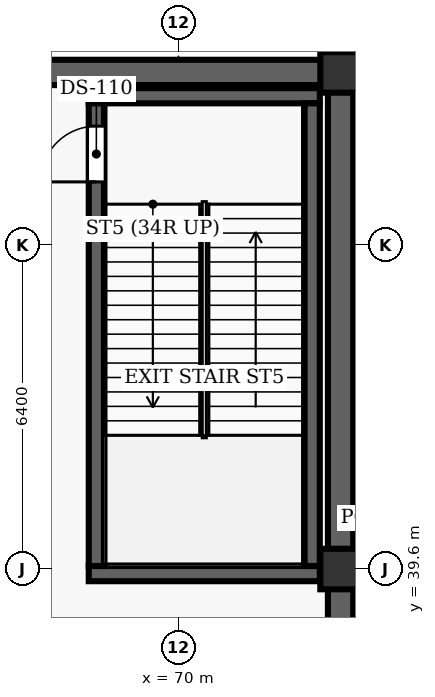
"""IFC4 building model, lengths in metres.
Left out: names, types, materials, properties, quantities, classifications, styles, units other than length and angle.
Written with IfcOpenShell. Run it as: python <this file> out.ifc"""

import sys

from ifc_helpers import new_model, si_unit, direction, frame, frame_2d, origin, origin_2d, place, context, subcontext, project, spatial, rectangle, extrude, element, fill, save


model = new_model("IFC4")
c1 = context("Model", 3, precision=1e-05, world=origin(), true_north=direction((0.0, 1.0)))
c2 = subcontext(c1, "Body", "Model", "MODEL_VIEW")
j1 = project(units=[si_unit("LENGTHUNIT", "METRE"), si_unit("PLANEANGLEUNIT", "RADIAN")], contexts=[c1])
p1 = place(None, origin())
s1 = spatial("IfcSite", under=j1, at=p1, CompositionType="ELEMENT")
p2 = place(p1, origin())
s2 = spatial("IfcBuilding", under=s1, at=p2, CompositionType="ELEMENT")
p3 = place(p2, frame((0.0, 0.0, -6.0)))
s3 = spatial("IfcBuildingStorey", under=s2, at=p3, CompositionType="ELEMENT", Elevation=-6.0)
p4 = place(p3, frame((38.0, 49.4, -0.45), z_axis=(0.0, 0.0, 1.0), x_axis=(1.0, 0.0, 0.0)))
e1 = element("IfcWall", 1, at=p4, inside=s3, PredefinedType="USERDEFINED", context=c2, shape_type="SweptSolid", body=[
    extrude(rectangle(XDim=37.75, YDim=0.5, at=frame_2d((18.875, 0.0))), origin(), (0.0, 0.0, 1.0), 6.1),
])
p5 = place(p3, frame((73.2, 26.0, -0.45), z_axis=(0.0, 0.0, 1.0), x_axis=(0.0, 1.0, 0.0)))
e2 = element("IfcWall", 2, at=p5, inside=s3, PredefinedType="USERDEFINED", context=c2, shape_type="SweptSolid", body=[
    extrude(rectangle(XDim=23.15, YDim=0.5, at=frame_2d((11.575, 0.0))), origin(), (0.0, 0.0, 1.0), 6.1),
])
for number, where, z_axis, x_axis in (
    (3, (73.2, 39.6, -0.45), (0.0, 0.0, 1.0), (1.0, 0.0, 0.0)),
    (4, (73.2, 49.4, -0.45), (0.0, 0.0, 1.0), (1.0, 0.0, 0.0)),
):
    element("IfcColumn", number, at=place(p3, frame(where, z_axis=z_axis, x_axis=x_axis)), inside=s3, PredefinedType="COLUMN", context=c2, shape_type="SweptSolid", body=[
        extrude(rectangle(XDim=0.8, YDim=0.8, at=origin_2d()), origin(), (0.0, 0.0, 1.0), 6.45),
    ])
for number, where, z_axis, x_axis in (
    (5, (68.23, 39.51, -0.45), (0.0, 0.0, 1.0), (1.0, 0.0, 0.0)),
    (6, (68.23, 48.94, -0.45), (0.0, 0.0, 1.0), (1.0, 0.0, 0.0)),
):
    element("IfcWall", number, at=place(p3, frame(where, z_axis=z_axis, x_axis=x_axis)), inside=s3, PredefinedType="SHEAR", context=c2, shape_type="SweptSolid", body=[
        extrude(rectangle(XDim=4.56, YDim=0.3, at=frame_2d((2.28, 0.0))), origin(), (0.0, 0.0, 1.0), 6.45),
    ])
p6 = place(p3, frame((68.38, 39.66, -0.45), z_axis=(0.0, 0.0, 1.0), x_axis=(0.0, 1.0, 0.0)))
e7 = element("IfcWall", 7, at=p6, inside=s3, PredefinedType="SHEAR", context=c2, shape_type="SweptSolid", body=[
    extrude(rectangle(XDim=9.13, YDim=0.3, at=frame_2d((4.565, 0.0))), origin(), (0.0, 0.0, 1.0), 6.45),
])
p7 = place(p6, frame((7.58, 0.0, 0.45)))
e8 = element("IfcOpeningElement", 8, at=p7, cuts=e7, PredefinedType="OPENING", context=c2, shape_type="SweptSolid", body=[
    extrude(rectangle(XDim=1.1, YDim=2.15, at=frame_2d((0.55, 1.075))), frame((0.0, 0.16, 0.0), z_axis=(0.0, -1.0, 0.0), x_axis=(1.0, 0.0, 0.0)), (0.0, 0.0, 1.0), 0.32),
])
p8 = place(p3, frame((72.64, 48.79, -0.45), z_axis=(0.0, 0.0, 1.0), x_axis=(0.0, -1.0, 0.0)))
e9 = element("IfcWall", 9, at=p8, inside=s3, PredefinedType="SHEAR", context=c2, shape_type="SweptSolid", body=[
    extrude(rectangle(XDim=9.13, YDim=0.3, at=frame_2d((4.565, 0.0))), origin(), (0.0, 0.0, 1.0), 6.45),
])
p9 = place(p7, origin())
e10 = element("IfcDoor", 10, at=p9, inside=s3, OperationType="SINGLE_SWING_LEFT", PredefinedType="DOOR", context=c2, shape_type="SweptSolid", body=[
    extrude(rectangle(XDim=1.1, YDim=2.15, at=frame_2d((0.55, 1.075))), frame((0.0, 0.025, 0.0), z_axis=(0.0, -1.0, 0.0), x_axis=(1.0, 0.0, 0.0)), (0.0, 0.0, 1.0), 0.05),
])
fill(e8, e10)
save(model, sys.argv[1])
